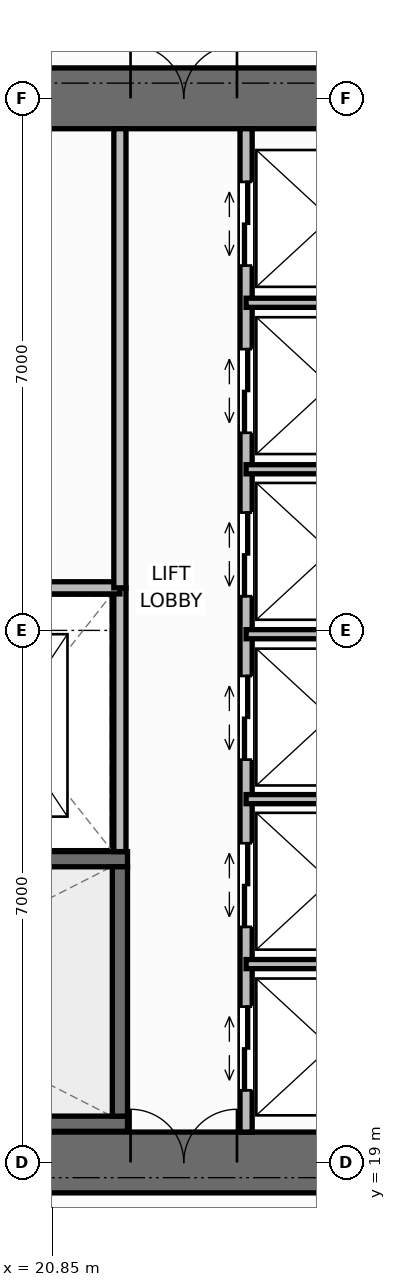
"""IFC4 building model, lengths in metres.
Left out: names, types, materials, properties, quantities, classifications, styles, units other than length and angle.
Written with IfcOpenShell. Run it as: python <this file> out.ifc"""

import sys

from ifc_helpers import new_model, si_unit, direction, frame, frame_2d, origin, place, context, subcontext, project, spatial, rectangle, extrude, element, fill, save


model = new_model("IFC4")
c1 = context("Model", 3, precision=1e-05, world=origin(), true_north=direction((0.0, 1.0)))
c2 = subcontext(c1, "Body", "Model", "MODEL_VIEW")
j1 = project(units=[si_unit("LENGTHUNIT", "METRE"), si_unit("PLANEANGLEUNIT", "RADIAN")], contexts=[c1])
p1 = place(None, origin())
s1 = spatial("IfcSite", under=j1, at=p1, CompositionType="ELEMENT")
p2 = place(p1, origin())
s2 = spatial("IfcBuilding", under=s1, at=p2, CompositionType="ELEMENT")
p3 = place(p2, origin())
s3 = spatial("IfcBuildingStorey", under=s2, at=p3, CompositionType="ELEMENT", Elevation=0.0)
p4 = place(p3, frame((12.6, 19.0, 0.0), z_axis=(0.0, 0.0, 1.0), x_axis=(1.0, 0.0, 0.0)))
e1 = element("IfcWall", 1, at=p4, inside=s3, PredefinedType="SHEAR", context=c2, shape_type="SweptSolid", body=[
    extrude(rectangle(XDim=13.8, YDim=0.8, at=frame_2d((6.9, 0.0))), origin(), (0.0, 0.0, 1.0), 6.0),
])
p5 = place(p4, frame((9.28, 0.0, 0.0)))
e2 = element("IfcOpeningElement", 2, at=p5, cuts=e1, PredefinedType="OPENING", context=c2, shape_type="SweptSolid", body=[
    extrude(rectangle(XDim=1.4, YDim=2.2, at=frame_2d((0.7, 1.1))), frame((0.0, 0.41, 0.0), z_axis=(0.0, -1.0, 0.0), x_axis=(1.0, 0.0, 0.0)), (0.0, 0.0, 1.0), 0.82),
])
p6 = place(p3, frame((12.6, 33.0, 0.0), z_axis=(0.0, 0.0, 1.0), x_axis=(1.0, 0.0, 0.0)))
e3 = element("IfcWall", 3, at=p6, inside=s3, PredefinedType="SHEAR", context=c2, shape_type="SweptSolid", body=[
    extrude(rectangle(XDim=13.8, YDim=0.8, at=frame_2d((6.9, 0.0))), origin(), (0.0, 0.0, 1.0), 6.0),
])
p7 = place(p6, frame((1.3, 0.0, 0.0)))
e4 = element("IfcOpeningElement", 4, at=p7, cuts=e3, PredefinedType="OPENING", context=c2, shape_type="SweptSolid", body=[
    extrude(rectangle(XDim=0.9, YDim=2.15, at=frame_2d((0.45, 1.075))), frame((0.0, 0.41, 0.0), z_axis=(0.0, -1.0, 0.0), x_axis=(1.0, 0.0, 0.0)), (0.0, 0.0, 1.0), 0.82),
])
p8 = place(p6, frame((3.9, 0.0, 0.0)))
e5 = element("IfcOpeningElement", 5, at=p8, cuts=e3, PredefinedType="OPENING", context=c2, shape_type="SweptSolid", body=[
    extrude(rectangle(XDim=0.95, YDim=2.15, at=frame_2d((0.475, 1.075))), frame((0.0, 0.41, 0.0), z_axis=(0.0, -1.0, 0.0), x_axis=(1.0, 0.0, 0.0)), (0.0, 0.0, 1.0), 0.82),
])
p9 = place(p6, frame((6.9, 0.0, 0.0)))
e6 = element("IfcOpeningElement", 6, at=p9, cuts=e3, PredefinedType="OPENING", context=c2, shape_type="SweptSolid", body=[
    extrude(rectangle(XDim=0.95, YDim=2.15, at=frame_2d((0.475, 1.075))), frame((0.0, 0.41, 0.0), z_axis=(0.0, -1.0, 0.0), x_axis=(1.0, 0.0, 0.0)), (0.0, 0.0, 1.0), 0.82),
])
p10 = place(p6, frame((9.28, 0.0, 0.0)))
e7 = element("IfcOpeningElement", 7, at=p10, cuts=e3, PredefinedType="OPENING", context=c2, shape_type="SweptSolid", body=[
    extrude(rectangle(XDim=1.4, YDim=2.2, at=frame_2d((0.7, 1.1))), frame((0.0, 0.41, 0.0), z_axis=(0.0, -1.0, 0.0), x_axis=(1.0, 0.0, 0.0)), (0.0, 0.0, 1.0), 0.82),
])
p11 = place(p3, frame((13.41, 19.51, 0.0), z_axis=(0.0, 0.0, 1.0), x_axis=(1.0, 0.0, 0.0)))
e8 = element("IfcWall", 8, at=p11, inside=s3, PredefinedType="SHEAR", context=c2, shape_type="SweptSolid", body=[
    extrude(rectangle(XDim=8.43, YDim=0.2, at=frame_2d((4.215, 0.0))), origin(), (0.0, 0.0, 1.0), 6.0),
])
p12 = place(p3, frame((13.41, 22.99, 0.0), z_axis=(0.0, 0.0, 1.0), x_axis=(1.0, 0.0, 0.0)))
e9 = element("IfcWall", 9, at=p12, inside=s3, PredefinedType="SHEAR", context=c2, shape_type="SweptSolid", body=[
    extrude(rectangle(XDim=8.43, YDim=0.2, at=frame_2d((4.215, 0.0))), origin(), (0.0, 0.0, 1.0), 6.0),
])
p13 = place(p12, frame((0.45, 0.0, 0.0)))
e10 = element("IfcOpeningElement", 10, at=p13, cuts=e9, PredefinedType="OPENING", context=c2, shape_type="SweptSolid", body=[
    extrude(rectangle(XDim=1.0, YDim=2.15, at=frame_2d((0.5, 1.075))), frame((0.0, 0.11, 0.0), z_axis=(0.0, -1.0, 0.0), x_axis=(1.0, 0.0, 0.0)), (0.0, 0.0, 1.0), 0.22),
])
p14 = place(p3, frame((21.74, 19.61, 0.0), z_axis=(0.0, 0.0, 1.0), x_axis=(0.0, 1.0, 0.0)))
e11 = element("IfcWall", 11, at=p14, inside=s3, PredefinedType="SHEAR", context=c2, shape_type="SweptSolid", body=[
    extrude(rectangle(XDim=3.28, YDim=0.2, at=frame_2d((1.64, 0.0))), origin(), (0.0, 0.0, 1.0), 6.0),
])
p15 = place(p3, frame((21.74, 23.09, 0.0), z_axis=(0.0, 0.0, 1.0), x_axis=(0.0, 1.0, 0.0)))
e12 = element("IfcWall", 12, at=p15, inside=s3, PredefinedType="STANDARD", context=c2, shape_type="SweptSolid", body=[
    extrude(rectangle(XDim=3.47, YDim=0.16, at=frame_2d((1.735, 0.0))), origin(), (0.0, 0.0, 1.0), 5.72),
])
p16 = place(p3, frame((13.4, 26.56, 0.0), z_axis=(0.0, 0.0, 1.0), x_axis=(1.0, 0.0, 0.0)))
e13 = element("IfcWall", 13, at=p16, inside=s3, PredefinedType="STANDARD", context=c2, shape_type="SweptSolid", body=[
    extrude(rectangle(XDim=8.34, YDim=0.16, at=frame_2d((4.17, 0.0))), origin(), (0.0, 0.0, 1.0), 5.72),
])
p17 = place(p3, frame((21.74, 26.56, 0.0), z_axis=(0.0, 0.0, 1.0), x_axis=(0.0, 1.0, 0.0)))
e14 = element("IfcWall", 14, at=p17, inside=s3, PredefinedType="STANDARD", context=c2, shape_type="SweptSolid", body=[
    extrude(rectangle(XDim=6.04, YDim=0.16, at=frame_2d((3.02, 0.0))), origin(), (0.0, 0.0, 1.0), 5.72),
])
p18 = place(p3, frame((23.4, 19.4, 0.0), z_axis=(0.0, 0.0, 1.0), x_axis=(0.0, 1.0, 0.0)))
e15 = element("IfcWall", 15, at=p18, inside=s3, PredefinedType="STANDARD", context=c2, shape_type="SweptSolid", body=[
    extrude(rectangle(XDim=13.2, YDim=0.16, at=frame_2d((6.6, 0.0))), origin(), (0.0, 0.0, 1.0), 5.72),
])
p19 = place(p18, frame((0.55, 0.0, 0.0)))
e16 = element("IfcOpeningElement", 16, at=p19, cuts=e15, PredefinedType="OPENING", context=c2, shape_type="SweptSolid", body=[
    extrude(rectangle(XDim=1.1, YDim=2.2, at=frame_2d((0.55, 1.1))), frame((0.0, 0.09, 0.0), z_axis=(0.0, -1.0, 0.0), x_axis=(1.0, 0.0, 0.0)), (0.0, 0.0, 1.0), 0.18),
])
p20 = place(p18, frame((2.7, 0.0, 0.0)))
e17 = element("IfcOpeningElement", 17, at=p20, cuts=e15, PredefinedType="OPENING", context=c2, shape_type="SweptSolid", body=[
    extrude(rectangle(XDim=1.1, YDim=2.2, at=frame_2d((0.55, 1.1))), frame((0.0, 0.09, 0.0), z_axis=(0.0, -1.0, 0.0), x_axis=(1.0, 0.0, 0.0)), (0.0, 0.0, 1.0), 0.18),
])
p21 = place(p18, frame((4.9, 0.0, 0.0)))
e18 = element("IfcOpeningElement", 18, at=p21, cuts=e15, PredefinedType="OPENING", context=c2, shape_type="SweptSolid", body=[
    extrude(rectangle(XDim=1.1, YDim=2.2, at=frame_2d((0.55, 1.1))), frame((0.0, 0.09, 0.0), z_axis=(0.0, -1.0, 0.0), x_axis=(1.0, 0.0, 0.0)), (0.0, 0.0, 1.0), 0.18),
])
p22 = place(p18, frame((7.05, 0.0, 0.0)))
e19 = element("IfcOpeningElement", 19, at=p22, cuts=e15, PredefinedType="OPENING", context=c2, shape_type="SweptSolid", body=[
    extrude(rectangle(XDim=1.1, YDim=2.2, at=frame_2d((0.55, 1.1))), frame((0.0, 0.09, 0.0), z_axis=(0.0, -1.0, 0.0), x_axis=(1.0, 0.0, 0.0)), (0.0, 0.0, 1.0), 0.18),
])
p23 = place(p18, frame((9.2, 0.0, 0.0)))
e20 = element("IfcOpeningElement", 20, at=p23, cuts=e15, PredefinedType="OPENING", context=c2, shape_type="SweptSolid", body=[
    extrude(rectangle(XDim=1.1, YDim=2.2, at=frame_2d((0.55, 1.1))), frame((0.0, 0.09, 0.0), z_axis=(0.0, -1.0, 0.0), x_axis=(1.0, 0.0, 0.0)), (0.0, 0.0, 1.0), 0.18),
])
p24 = place(p18, frame((11.4, 0.0, 0.0)))
e21 = element("IfcOpeningElement", 21, at=p24, cuts=e15, PredefinedType="OPENING", context=c2, shape_type="SweptSolid", body=[
    extrude(rectangle(XDim=1.1, YDim=2.2, at=frame_2d((0.55, 1.1))), frame((0.0, 0.09, 0.0), z_axis=(0.0, -1.0, 0.0), x_axis=(1.0, 0.0, 0.0)), (0.0, 0.0, 1.0), 0.18),
])
for number, where, z_axis, x_axis in (
    (22, (23.4, 21.61, 0.0), (0.0, 0.0, 1.0), (1.0, 0.0, 0.0)),
    (23, (23.4, 23.78, 0.0), (0.0, 0.0, 1.0), (1.0, 0.0, 0.0)),
    (24, (23.4, 25.95, 0.0), (0.0, 0.0, 1.0), (1.0, 0.0, 0.0)),
    (25, (23.4, 28.12, 0.0), (0.0, 0.0, 1.0), (1.0, 0.0, 0.0)),
    (26, (23.4, 30.31, 0.0), (0.0, 0.0, 1.0), (1.0, 0.0, 0.0)),
):
    element("IfcWall", number, at=place(p3, frame(where, z_axis=z_axis, x_axis=x_axis)), inside=s3, PredefinedType="PARTITIONING", context=c2, shape_type="SweptSolid", body=[
        extrude(rectangle(XDim=2.2, YDim=0.12, at=frame_2d((1.1, 0.0))), origin(), (0.0, 0.0, 1.0), 5.72),
    ])
p25 = place(p5, origin())
e27 = element("IfcDoor", 27, at=p25, inside=s3, OperationType="DOUBLE_DOOR_SINGLE_SWING", PredefinedType="DOOR", context=c2, shape_type="SweptSolid", body=[
    extrude(rectangle(XDim=1.4, YDim=2.2, at=frame_2d((0.7, 1.1))), frame((0.0, 0.125, 0.0), z_axis=(0.0, -1.0, 0.0), x_axis=(1.0, 0.0, 0.0)), (0.0, 0.0, 1.0), 0.05),
])
fill(e2, e27)
p26 = place(p10, origin())
e28 = element("IfcDoor", 28, at=p26, inside=s3, OperationType="DOUBLE_DOOR_SINGLE_SWING", PredefinedType="DOOR", context=c2, shape_type="SweptSolid", body=[
    extrude(rectangle(XDim=1.4, YDim=2.2, at=frame_2d((0.7, 1.1))), frame((0.0, -0.075, 0.0), z_axis=(0.0, -1.0, 0.0), x_axis=(1.0, 0.0, 0.0)), (0.0, 0.0, 1.0), 0.05),
])
fill(e7, e28)
p27 = place(p19, origin())
e29 = element("IfcDoor", 29, at=p27, inside=s3, OperationType="DOUBLE_DOOR_SLIDING", PredefinedType="DOOR", context=c2, shape_type="SweptSolid", body=[
    extrude(rectangle(XDim=1.1, YDim=2.2, at=frame_2d((0.55, 1.1))), frame((0.0, 0.025, 0.0), z_axis=(0.0, -1.0, 0.0), x_axis=(1.0, 0.0, 0.0)), (0.0, 0.0, 1.0), 0.05),
])
fill(e16, e29)
p28 = place(p20, origin())
e30 = element("IfcDoor", 30, at=p28, inside=s3, OperationType="DOUBLE_DOOR_SLIDING", PredefinedType="DOOR", context=c2, shape_type="SweptSolid", body=[
    extrude(rectangle(XDim=1.1, YDim=2.2, at=frame_2d((0.55, 1.1))), frame((0.0, 0.025, 0.0), z_axis=(0.0, -1.0, 0.0), x_axis=(1.0, 0.0, 0.0)), (0.0, 0.0, 1.0), 0.05),
])
fill(e17, e30)
p29 = place(p21, origin())
e31 = element("IfcDoor", 31, at=p29, inside=s3, OperationType="DOUBLE_DOOR_SLIDING", PredefinedType="DOOR", context=c2, shape_type="SweptSolid", body=[
    extrude(rectangle(XDim=1.1, YDim=2.2, at=frame_2d((0.55, 1.1))), frame((0.0, 0.025, 0.0), z_axis=(0.0, -1.0, 0.0), x_axis=(1.0, 0.0, 0.0)), (0.0, 0.0, 1.0), 0.05),
])
fill(e18, e31)
p30 = place(p22, origin())
e32 = element("IfcDoor", 32, at=p30, inside=s3, OperationType="DOUBLE_DOOR_SLIDING", PredefinedType="DOOR", context=c2, shape_type="SweptSolid", body=[
    extrude(rectangle(XDim=1.1, YDim=2.2, at=frame_2d((0.55, 1.1))), frame((0.0, 0.025, 0.0), z_axis=(0.0, -1.0, 0.0), x_axis=(1.0, 0.0, 0.0)), (0.0, 0.0, 1.0), 0.05),
])
fill(e19, e32)
p31 = place(p23, origin())
e33 = element("IfcDoor", 33, at=p31, inside=s3, OperationType="DOUBLE_DOOR_SLIDING", PredefinedType="DOOR", context=c2, shape_type="SweptSolid", body=[
    extrude(rectangle(XDim=1.1, YDim=2.2, at=frame_2d((0.55, 1.1))), frame((0.0, 0.025, 0.0), z_axis=(0.0, -1.0, 0.0), x_axis=(1.0, 0.0, 0.0)), (0.0, 0.0, 1.0), 0.05),
])
fill(e20, e33)
p32 = place(p24, origin())
e34 = element("IfcDoor", 34, at=p32, inside=s3, OperationType="DOUBLE_DOOR_SLIDING", PredefinedType="DOOR", context=c2, shape_type="SweptSolid", body=[
    extrude(rectangle(XDim=1.1, YDim=2.2, at=frame_2d((0.55, 1.1))), frame((0.0, 0.025, 0.0), z_axis=(0.0, -1.0, 0.0), x_axis=(1.0, 0.0, 0.0)), (0.0, 0.0, 1.0), 0.05),
])
fill(e21, e34)
save(model, sys.argv[1])
